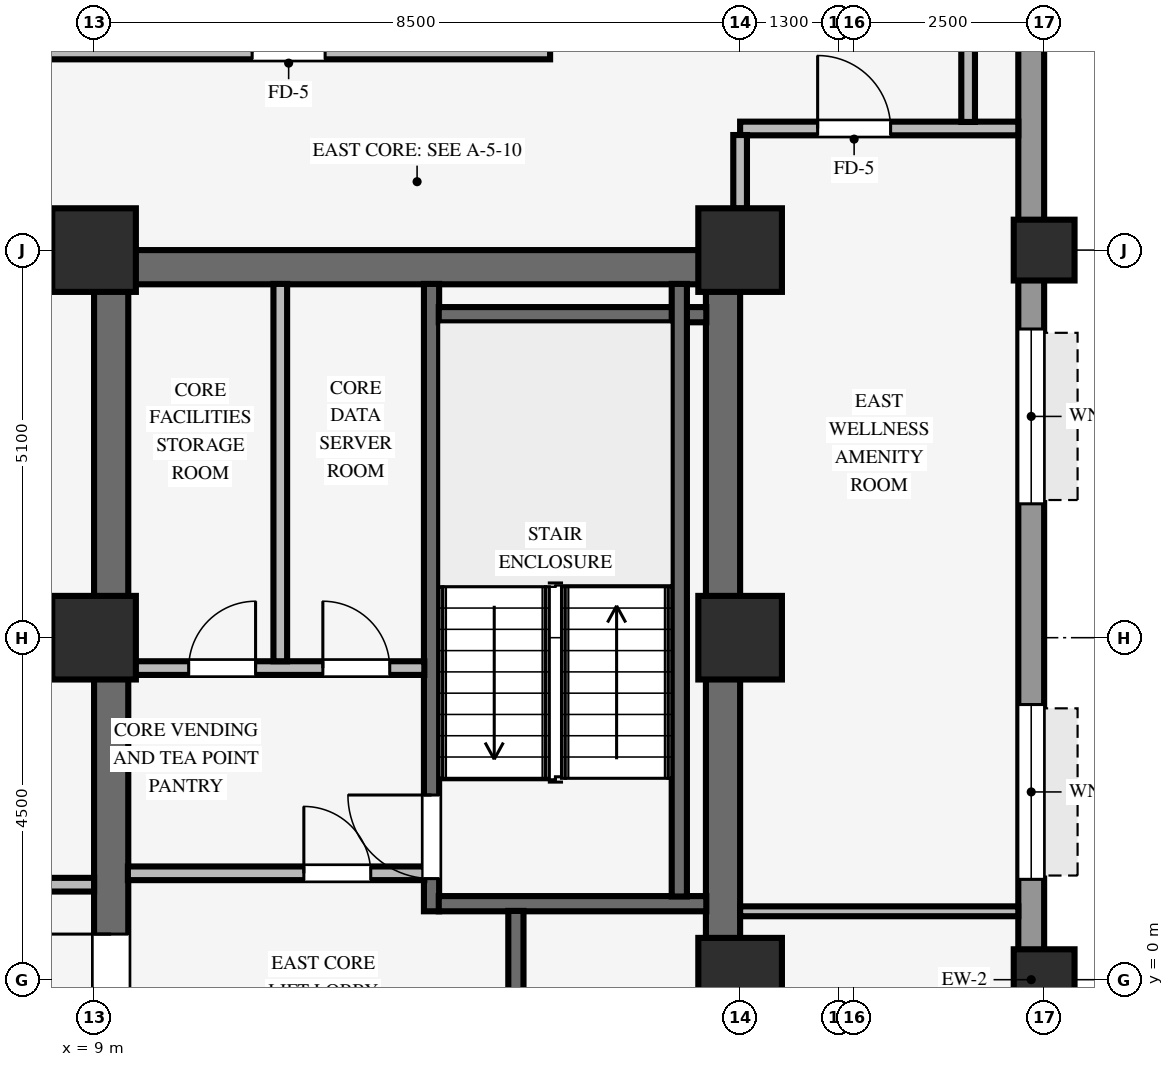
"""IFC4 building model, lengths in metres.
Left out: names, types, materials, properties, quantities, classifications, styles, units other than length and angle.
Written with IfcOpenShell. Run it as: python <this file> out.ifc"""

import sys

from ifc_helpers import new_model, si_unit, direction, frame, frame_2d, origin, origin_2d, place, context, subcontext, project, spatial, rectangle, hollow_rectangle, extrude, source, transform, mapped, element, fill, save


model = new_model("IFC4")
c1 = context("Model", 3, precision=1e-05, world=origin(), true_north=direction((0.0, 1.0)))
c2 = subcontext(c1, "Body", "Model", "MODEL_VIEW")
j1 = project(units=[si_unit("LENGTHUNIT", "METRE"), si_unit("PLANEANGLEUNIT", "RADIAN")], contexts=[c1])
p1 = place(None, origin())
s1 = spatial("IfcSite", under=j1, at=p1, CompositionType="ELEMENT")
p2 = place(p1, origin())
s2 = spatial("IfcBuilding", under=s1, at=p2, CompositionType="ELEMENT")
p3 = place(p2, frame((0.0, 0.0, 64.1)))
s3 = spatial("IfcBuildingStorey", under=s2, at=p3, CompositionType="ELEMENT", Elevation=64.1)
p4 = place(p3, frame((9.0, 9.375, 0.0), z_axis=(0.0, 0.0, 1.0), x_axis=(1.0, 0.0, 0.0)))
e1 = element("IfcWall", 1, at=p4, inside=s3, PredefinedType="SHEAR", context=c2, shape_type="SweptSolid", body=[
    extrude(rectangle(XDim=8.5, YDim=0.45, at=frame_2d((4.25, 0.0))), origin(), (0.0, 0.0, 1.0), 3.37),
])
p5 = place(p3, frame((9.225, -9.155, 0.0), z_axis=(0.0, 0.0, 1.0), x_axis=(0.0, 1.0, 0.0)))
e2 = element("IfcWall", 2, at=p5, inside=s3, PredefinedType="SHEAR", context=c2, shape_type="SweptSolid", body=[
    extrude(rectangle(XDim=18.31, YDim=0.45, at=frame_2d((9.155, 0.0))), origin(), (0.0, 0.0, 1.0), 3.37),
])
p6 = place(p5, frame((8.555, 0.0, 0.0)))
e3 = element("IfcOpeningElement", 3, at=p6, cuts=e2, PredefinedType="OPENING", context=c2, shape_type="SweptSolid", body=[
    extrude(rectangle(XDim=1.2, YDim=2.15, at=frame_2d((0.6, 1.075))), frame((0.0, 0.235, 0.0), z_axis=(0.0, -1.0, 0.0), x_axis=(1.0, 0.0, 0.0)), (0.0, 0.0, 1.0), 0.47),
])
p7 = place(p3, frame((17.275, -9.155, 0.0), z_axis=(0.0, 0.0, 1.0), x_axis=(0.0, 1.0, 0.0)))
e4 = element("IfcWall", 4, at=p7, inside=s3, PredefinedType="SHEAR", context=c2, shape_type="SweptSolid", body=[
    extrude(rectangle(XDim=18.31, YDim=0.45, at=frame_2d((9.155, 0.0))), origin(), (0.0, 0.0, 1.0), 3.37),
])
for number, where, z_axis, x_axis in (
    (5, (9.0, 4.5, 0.0), (0.0, 0.0, 1.0), (1.0, 0.0, 0.0)),
    (6, (9.0, 9.6, 0.0), (0.0, 0.0, 1.0), (1.0, 0.0, 0.0)),
    (7, (17.5, 4.5, 0.0), (0.0, 0.0, 1.0), (1.0, 0.0, 0.0)),
    (8, (17.5, 9.6, 0.0), (0.0, 0.0, 1.0), (1.0, 0.0, 0.0)),
    (9, (17.5, 0.0, 0.0), (0.0, 0.0, 1.0), (1.0, 0.0, 0.0)),
):
    element("IfcColumn", number, at=place(p3, frame(where, z_axis=z_axis, x_axis=x_axis)), inside=s3, PredefinedType="COLUMN", context=c2, shape_type="SweptSolid", body=[
        extrude(rectangle(XDim=1.1, YDim=1.1, at=origin_2d()), origin(), (0.0, 0.0, 1.0), 3.37),
    ])
for number, where, z_axis, x_axis in (
    (10, (21.5, 0.0, 0.0), (0.0, 0.0, 1.0), (1.0, 0.0, 0.0)),
    (11, (21.5, 9.6, 0.0), (0.0, 0.0, 1.0), (1.0, 0.0, 0.0)),
):
    element("IfcColumn", number, at=place(p3, frame(where, z_axis=z_axis, x_axis=x_axis)), inside=s3, PredefinedType="COLUMN", context=c2, shape_type="SweptSolid", body=[
        extrude(hollow_rectangle(XDim=0.8, YDim=0.8, WallThickness=0.055, InnerFilletRadius=0.055, OuterFilletRadius=0.11, at=origin_2d()), origin(), (0.0, 0.0, 1.0), 3.37),
    ])
p8 = place(p3, frame((21.33, -20.764, 0.0), z_axis=(0.0, 0.0, 1.0), x_axis=(0.0, 1.0, 0.0)))
e12 = element("IfcWall", 12, at=p8, inside=s3, PredefinedType="STANDARD", context=c2, shape_type="SweptSolid", body=[
    extrude(rectangle(XDim=41.528, YDim=0.34, at=frame_2d((20.764, 0.0))), origin(), (0.0, 0.0, 1.0), 2.705),
])
p9 = place(p8, frame((12.202, 0.0, 0.8)))
e13 = element("IfcOpeningElement", 13, at=p9, cuts=e12, PredefinedType="OPENING", context=c2, shape_type="SweptSolid", body=[
    extrude(rectangle(XDim=2.3, YDim=1.62, at=frame_2d((1.15, 0.81))), frame((0.0, 0.18, 0.0), z_axis=(0.0, -1.0, 0.0), x_axis=(1.0, 0.0, 0.0)), (0.0, 0.0, 1.0), 0.36),
])
p10 = place(p8, frame((17.144, 0.0, 0.8)))
e14 = element("IfcOpeningElement", 14, at=p10, cuts=e12, PredefinedType="OPENING", context=c2, shape_type="SweptSolid", body=[
    extrude(rectangle(XDim=2.3, YDim=1.62, at=frame_2d((1.15, 0.81))), frame((0.0, 0.18, 0.0), z_axis=(0.0, -1.0, 0.0), x_axis=(1.0, 0.0, 0.0)), (0.0, 0.0, 1.0), 0.36),
])
p11 = place(p8, frame((22.084, 0.0, 0.8)))
e15 = element("IfcOpeningElement", 15, at=p11, cuts=e12, PredefinedType="OPENING", context=c2, shape_type="SweptSolid", body=[
    extrude(rectangle(XDim=2.3, YDim=1.62, at=frame_2d((1.15, 0.81))), frame((0.0, 0.18, 0.0), z_axis=(0.0, -1.0, 0.0), x_axis=(1.0, 0.0, 0.0)), (0.0, 0.0, 1.0), 0.36),
])
p12 = place(p8, frame((27.025, 0.0, 0.8)))
e16 = element("IfcOpeningElement", 16, at=p12, cuts=e12, PredefinedType="OPENING", context=c2, shape_type="SweptSolid", body=[
    extrude(rectangle(XDim=2.3, YDim=1.62, at=frame_2d((1.15, 0.81))), frame((0.0, 0.18, 0.0), z_axis=(0.0, -1.0, 0.0), x_axis=(1.0, 0.0, 0.0)), (0.0, 0.0, 1.0), 0.36),
])
p13 = place(p3, frame((13.44, 0.9, 0.0), z_axis=(0.0, 0.0, 1.0), x_axis=(0.0, 1.0, 0.0)))
e17 = element("IfcWall", 17, at=p13, inside=s3, PredefinedType="SHEAR", context=c2, shape_type="SweptSolid", body=[
    extrude(rectangle(XDim=8.255, YDim=0.2, at=frame_2d((4.127, 0.0))), origin(), (0.0, 0.0, 1.0), 3.37),
])
p14 = place(p13, frame((0.43, 0.0, 0.0)))
e18 = element("IfcOpeningElement", 18, at=p14, cuts=e17, PredefinedType="OPENING", context=c2, shape_type="SweptSolid", body=[
    extrude(rectangle(XDim=1.1, YDim=2.15, at=frame_2d((0.55, 1.075))), frame((0.0, 0.11, 0.0), z_axis=(0.0, -1.0, 0.0), x_axis=(1.0, 0.0, 0.0)), (0.0, 0.0, 1.0), 0.22),
])
for number, where, z_axis, x_axis in (
    (19, (13.535, 1.0, 0.0), (0.0, 0.0, 1.0), (1.0, 0.0, 0.0)),
    (20, (13.535, 8.75, 0.0), (0.0, 0.0, 1.0), (1.0, 0.0, 0.0)),
):
    element("IfcWall", number, at=place(p3, frame(where, z_axis=z_axis, x_axis=x_axis)), inside=s3, PredefinedType="SHEAR", context=c2, shape_type="SweptSolid", body=[
        extrude(rectangle(XDim=3.52, YDim=0.2, at=frame_2d((1.76, 0.0))), origin(), (0.0, 0.0, 1.0), 3.37),
    ])
p15 = place(p3, frame((16.7, 1.095, 0.0), z_axis=(0.0, 0.0, 1.0), x_axis=(0.0, 1.0, 0.0)))
e21 = element("IfcWall", 21, at=p15, inside=s3, PredefinedType="SHEAR", context=c2, shape_type="SweptSolid", body=[
    extrude(rectangle(XDim=8.06, YDim=0.2, at=frame_2d((4.03, 0.0))), origin(), (0.0, 0.0, 1.0), 3.37),
])
p16 = place(p3, frame((14.55, -9.155, 0.0), z_axis=(0.0, 0.0, 1.0), x_axis=(0.0, 1.0, 0.0)))
e22 = element("IfcWall", 22, at=p16, inside=s3, PredefinedType="SHEAR", context=c2, shape_type="SweptSolid", body=[
    extrude(rectangle(XDim=10.06, YDim=0.2, at=frame_2d((5.03, 0.0))), origin(), (0.0, 0.0, 1.0), 3.37),
])
p17 = place(p16, frame((6.515, 0.0, 0.0)))
e23 = element("IfcOpeningElement", 23, at=p17, cuts=e22, PredefinedType="OPENING", context=c2, shape_type="SweptSolid", body=[
    extrude(rectangle(XDim=0.88, YDim=2.1, at=frame_2d((0.44, 1.05))), frame((0.0, 0.11, 0.0), z_axis=(0.0, -1.0, 0.0), x_axis=(1.0, 0.0, 0.0)), (0.0, 0.0, 1.0), 0.22),
])
p18 = place(p16, frame((0.88, 0.0, 0.0)))
e24 = element("IfcOpeningElement", 24, at=p18, cuts=e22, PredefinedType="OPENING", context=c2, shape_type="SweptSolid", body=[
    extrude(rectangle(XDim=1.15, YDim=2.15, at=frame_2d((0.575, 1.075))), frame((0.0, 0.11, 0.0), z_axis=(0.0, -1.0, 0.0), x_axis=(1.0, 0.0, 0.0)), (0.0, 0.0, 1.0), 0.22),
])
p19 = place(p3, frame((9.445, 1.4, 0.0), z_axis=(0.0, 0.0, 1.0), x_axis=(1.0, 0.0, 0.0)))
e25 = element("IfcWall", 25, at=p19, inside=s3, PredefinedType="PARTITIONING", context=c2, shape_type="SweptSolid", body=[
    extrude(rectangle(XDim=3.9, YDim=0.18, at=frame_2d((1.95, 0.0))), origin(), (0.0, 0.0, 1.0), 3.36),
])
p20 = place(p19, frame((2.315, 0.0, 0.0)))
e26 = element("IfcOpeningElement", 26, at=p20, cuts=e25, PredefinedType="OPENING", context=c2, shape_type="SweptSolid", body=[
    extrude(rectangle(XDim=0.88, YDim=2.1, at=frame_2d((0.44, 1.05))), frame((0.0, 0.1, 0.0), z_axis=(0.0, -1.0, 0.0), x_axis=(1.0, 0.0, 0.0)), (0.0, 0.0, 1.0), 0.2),
])
p21 = place(p3, frame((9.445, 4.1, 0.0), z_axis=(0.0, 0.0, 1.0), x_axis=(1.0, 0.0, 0.0)))
e27 = element("IfcWall", 27, at=p21, inside=s3, PredefinedType="PARTITIONING", context=c2, shape_type="SweptSolid", body=[
    extrude(rectangle(XDim=3.9, YDim=0.18, at=frame_2d((1.95, 0.0))), origin(), (0.0, 0.0, 1.0), 3.36),
])
p22 = place(p21, frame((0.8, 0.0, 0.0)))
e28 = element("IfcOpeningElement", 28, at=p22, cuts=e27, PredefinedType="OPENING", context=c2, shape_type="SweptSolid", body=[
    extrude(rectangle(XDim=0.88, YDim=2.1, at=frame_2d((0.44, 1.05))), frame((0.0, 0.1, 0.0), z_axis=(0.0, -1.0, 0.0), x_axis=(1.0, 0.0, 0.0)), (0.0, 0.0, 1.0), 0.2),
])
p23 = place(p21, frame((2.565, 0.0, 0.0)))
e29 = element("IfcOpeningElement", 29, at=p23, cuts=e27, PredefinedType="OPENING", context=c2, shape_type="SweptSolid", body=[
    extrude(rectangle(XDim=0.88, YDim=2.1, at=frame_2d((0.44, 1.05))), frame((0.0, 0.1, 0.0), z_axis=(0.0, -1.0, 0.0), x_axis=(1.0, 0.0, 0.0)), (0.0, 0.0, 1.0), 0.2),
])
p24 = place(p3, frame((11.45, 4.19, 0.0), z_axis=(0.0, 0.0, 1.0), x_axis=(0.0, 1.0, 0.0)))
e30 = element("IfcWall", 30, at=p24, inside=s3, PredefinedType="PARTITIONING", context=c2, shape_type="SweptSolid", body=[
    extrude(rectangle(XDim=4.965, YDim=0.18, at=frame_2d((2.482, 0.0))), origin(), (0.0, 0.0, 1.0), 3.36),
])
p25 = place(p3, frame((17.5, 0.9, 0.0), z_axis=(0.0, 0.0, 1.0), x_axis=(1.0, 0.0, 0.0)))
e31 = element("IfcWall", 31, at=p25, inside=s3, PredefinedType="PARTITIONING", context=c2, shape_type="SweptSolid", body=[
    extrude(rectangle(XDim=3.66, YDim=0.13, at=frame_2d((1.83, 0.0))), origin(), (0.0, 0.0, 1.0), 3.36),
])
p26 = place(p3, frame((-0.8, 1.25, 0.0), z_axis=(0.0, 0.0, 1.0), x_axis=(1.0, 0.0, 0.0)))
e32 = element("IfcWall", 32, at=p26, inside=s3, PredefinedType="PARTITIONING", context=c2, shape_type="SweptSolid", body=[
    extrude(rectangle(XDim=9.8, YDim=0.18, at=frame_2d((4.9, 0.0))), origin(), (0.0, 0.0, 1.0), 3.36),
])
p27 = place(p26, frame((4.42, 0.0, 0.0)))
e33 = element("IfcOpeningElement", 33, at=p27, cuts=e32, PredefinedType="OPENING", context=c2, shape_type="SweptSolid", body=[
    extrude(rectangle(XDim=0.96, YDim=2.1, at=frame_2d((0.48, 1.05))), frame((0.0, 0.1, 0.0), z_axis=(0.0, -1.0, 0.0), x_axis=(1.0, 0.0, 0.0)), (0.0, 0.0, 1.0), 0.2),
])
p28 = place(p3, frame((0.176, 9.6, 0.0), z_axis=(0.0, 0.0, 1.0), x_axis=(1.0, 0.0, 0.0)))
e34 = element("IfcWall", 34, at=p28, inside=s3, PredefinedType="PARTITIONING", context=c2, shape_type="SweptSolid", body=[
    extrude(rectangle(XDim=8.278, YDim=0.18, at=frame_2d((4.139, 0.0))), origin(), (0.0, 0.0, 1.0), 2.405),
])
p29 = place(p3, frame((17.5, 11.2, 0.0), z_axis=(0.0, 0.0, 1.0), x_axis=(1.0, 0.0, 0.0)))
e35 = element("IfcWall", 35, at=p29, inside=s3, PredefinedType="PARTITIONING", context=c2, shape_type="SweptSolid", body=[
    extrude(rectangle(XDim=3.66, YDim=0.18, at=frame_2d((1.83, 0.0))), origin(), (0.0, 0.0, 1.0), 3.36),
])
p30 = place(p29, frame((1.02, 0.0, 0.0)))
e36 = element("IfcOpeningElement", 36, at=p30, cuts=e35, PredefinedType="OPENING", context=c2, shape_type="SweptSolid", body=[
    extrude(rectangle(XDim=0.96, YDim=2.1, at=frame_2d((0.48, 1.05))), frame((0.0, 0.1, 0.0), z_axis=(0.0, -1.0, 0.0), x_axis=(1.0, 0.0, 0.0)), (0.0, 0.0, 1.0), 0.2),
])
p31 = place(p3, frame((-15.0, 12.2, 0.0), z_axis=(0.0, 0.0, 1.0), x_axis=(1.0, 0.0, 0.0)))
e37 = element("IfcWall", 37, at=p31, inside=s3, PredefinedType="PARTITIONING", context=c2, shape_type="SweptSolid", body=[
    extrude(rectangle(XDim=30.0, YDim=0.18, at=frame_2d((15.0, 0.0))), origin(), (0.0, 0.0, 1.0), 3.36),
])
p32 = place(p31, frame((2.195, 0.0, 0.0)))
e38 = element("IfcOpeningElement", 38, at=p32, cuts=e37, PredefinedType="OPENING", context=c2, shape_type="SweptSolid", body=[
    extrude(rectangle(XDim=0.96, YDim=2.1, at=frame_2d((0.48, 1.05))), frame((0.0, 0.1, 0.0), z_axis=(0.0, -1.0, 0.0), x_axis=(1.0, 0.0, 0.0)), (0.0, 0.0, 1.0), 0.2),
])
p33 = place(p31, frame((16.395, 0.0, 0.0)))
e39 = element("IfcOpeningElement", 39, at=p33, cuts=e37, PredefinedType="OPENING", context=c2, shape_type="SweptSolid", body=[
    extrude(rectangle(XDim=0.96, YDim=2.1, at=frame_2d((0.48, 1.05))), frame((0.0, 0.1, 0.0), z_axis=(0.0, -1.0, 0.0), x_axis=(1.0, 0.0, 0.0)), (0.0, 0.0, 1.0), 0.2),
])
p34 = place(p31, frame((21.62, 0.0, 0.0)))
e40 = element("IfcOpeningElement", 40, at=p34, cuts=e37, PredefinedType="OPENING", context=c2, shape_type="SweptSolid", body=[
    extrude(rectangle(XDim=0.96, YDim=2.1, at=frame_2d((0.48, 1.05))), frame((0.0, 0.1, 0.0), z_axis=(0.0, -1.0, 0.0), x_axis=(1.0, 0.0, 0.0)), (0.0, 0.0, 1.0), 0.2),
])
p35 = place(p31, frame((7.33, 0.0, 0.0)))
e41 = element("IfcOpeningElement", 41, at=p35, cuts=e37, PredefinedType="OPENING", context=c2, shape_type="SweptSolid", body=[
    extrude(rectangle(XDim=0.96, YDim=2.1, at=frame_2d((0.48, 1.05))), frame((0.0, 0.1, 0.0), z_axis=(0.0, -1.0, 0.0), x_axis=(1.0, 0.0, 0.0)), (0.0, 0.0, 1.0), 0.2),
])
p36 = place(p31, frame((26.08, 0.0, 0.0)))
e42 = element("IfcOpeningElement", 42, at=p36, cuts=e37, PredefinedType="OPENING", context=c2, shape_type="SweptSolid", body=[
    extrude(rectangle(XDim=0.96, YDim=2.1, at=frame_2d((0.48, 1.05))), frame((0.0, 0.1, 0.0), z_axis=(0.0, -1.0, 0.0), x_axis=(1.0, 0.0, 0.0)), (0.0, 0.0, 1.0), 0.2),
])
p37 = place(p31, frame((12.52, 0.0, 0.0)))
e43 = element("IfcOpeningElement", 43, at=p37, cuts=e37, PredefinedType="OPENING", context=c2, shape_type="SweptSolid", body=[
    extrude(rectangle(XDim=0.96, YDim=2.1, at=frame_2d((0.48, 1.05))), frame((0.0, 0.1, 0.0), z_axis=(0.0, -1.0, 0.0), x_axis=(1.0, 0.0, 0.0)), (0.0, 0.0, 1.0), 0.2),
])
p38 = place(p3, frame((17.5, 10.146, 0.0), z_axis=(0.0, 0.0, 1.0), x_axis=(0.0, 1.0, 0.0)))
e44 = element("IfcWall", 44, at=p38, inside=s3, PredefinedType="PARTITIONING", context=c2, shape_type="SweptSolid", body=[
    extrude(rectangle(XDim=0.968, YDim=0.18, at=frame_2d((0.484, 0.0))), origin(), (0.0, 0.0, 1.0), 2.738),
])
p39 = place(p3, frame((20.5, 11.286, 0.0), z_axis=(0.0, 0.0, 1.0), x_axis=(0.0, 1.0, 0.0)))
e45 = element("IfcWall", 45, at=p39, inside=s3, PredefinedType="PARTITIONING", context=c2, shape_type="SweptSolid", body=[
    extrude(rectangle(XDim=2.228, YDim=0.18, at=frame_2d((1.114, 0.0))), origin(), (0.0, 0.0, 1.0), 3.36),
])
m1 = source(origin(), c2, "Body", "SweptSolid", [
    extrude(rectangle(XDim=2.3, YDim=1.62, at=frame_2d((1.15, 0.81))), frame((0.0, 0.03, 0.0), z_axis=(0.0, -1.0, 0.0), x_axis=(1.0, 0.0, 0.0)), (0.0, 0.0, 1.0), 0.06),
])
p40 = place(p11, origin())
e46 = element("IfcWindow", 46, at=p40, inside=s3, PartitioningType="SINGLE_PANEL", PredefinedType="WINDOW", context=c2, shape_type="MappedRepresentation", body=[
    mapped(m1, transform((0.0, 0.0, 0.0), scale=1.0)),
])
fill(e15, e46)
p41 = place(p12, origin())
e47 = element("IfcWindow", 47, at=p41, inside=s3, PartitioningType="SINGLE_PANEL", PredefinedType="WINDOW", context=c2, shape_type="MappedRepresentation", body=[
    mapped(m1, transform((0.0, 0.0, 0.0), scale=1.0)),
])
fill(e16, e47)
m2 = source(origin(), c2, "Body", "SweptSolid", [
    extrude(rectangle(XDim=1.1, YDim=2.15, at=frame_2d((0.55, 1.075))), frame((0.0, 0.025, 0.0), z_axis=(0.0, -1.0, 0.0), x_axis=(1.0, 0.0, 0.0)), (0.0, 0.0, 1.0), 0.05),
])
p42 = place(p14, origin())
e48 = element("IfcDoor", 48, at=p42, inside=s3, OperationType="SINGLE_SWING_RIGHT", PredefinedType="DOOR", context=c2, shape_type="MappedRepresentation", body=[
    mapped(m2, transform((0.0, 0.0, 0.0), scale=1.0)),
])
fill(e18, e48)
m3 = source(origin(), c2, "Body", "SweptSolid", [
    extrude(rectangle(XDim=1.2, YDim=2.15, at=frame_2d((0.6, 1.075))), frame((0.0, 0.025, 0.0), z_axis=(0.0, -1.0, 0.0), x_axis=(1.0, 0.0, 0.0)), (0.0, 0.0, 1.0), 0.05),
])
p43 = place(p6, origin())
e49 = element("IfcDoor", 49, at=p43, inside=s3, OperationType="SINGLE_SWING_RIGHT", PredefinedType="DOOR", context=c2, shape_type="MappedRepresentation", body=[
    mapped(m3, transform((0.0, 0.0, 0.0), scale=1.0)),
])
fill(e3, e49)
m4 = source(origin(), c2, "Body", "SweptSolid", [
    extrude(rectangle(XDim=0.88, YDim=2.1, at=frame_2d((0.44, 1.05))), frame((0.0, 0.025, 0.0), z_axis=(0.0, -1.0, 0.0), x_axis=(1.0, 0.0, 0.0)), (0.0, 0.0, 1.0), 0.05),
])
p44 = place(p20, origin())
e50 = element("IfcDoor", 50, at=p44, inside=s3, OperationType="SINGLE_SWING_LEFT", PredefinedType="DOOR", context=c2, shape_type="MappedRepresentation", body=[
    mapped(m4, transform((0.0, 0.0, 0.0), scale=1.0)),
])
fill(e26, e50)
p45 = place(p22, origin())
e51 = element("IfcDoor", 51, at=p45, inside=s3, OperationType="SINGLE_SWING_RIGHT", PredefinedType="DOOR", context=c2, shape_type="MappedRepresentation", body=[
    mapped(m4, transform((0.0, 0.0, 0.0), scale=1.0)),
])
fill(e28, e51)
p46 = place(p23, origin())
e52 = element("IfcDoor", 52, at=p46, inside=s3, OperationType="SINGLE_SWING_LEFT", PredefinedType="DOOR", context=c2, shape_type="MappedRepresentation", body=[
    mapped(m4, transform((0.0, 0.0, 0.0), scale=1.0)),
])
fill(e29, e52)
m5 = source(origin(), c2, "Body", "SweptSolid", [
    extrude(rectangle(XDim=0.96, YDim=2.1, at=frame_2d((0.48, 1.05))), frame((0.0, 0.025, 0.0), z_axis=(0.0, -1.0, 0.0), x_axis=(1.0, 0.0, 0.0)), (0.0, 0.0, 1.0), 0.05),
])
p47 = place(p36, origin())
e53 = element("IfcDoor", 53, at=p47, inside=s3, OperationType="SINGLE_SWING_LEFT", PredefinedType="DOOR", context=c2, shape_type="MappedRepresentation", body=[
    mapped(m5, transform((0.0, 0.0, 0.0), scale=1.0)),
])
fill(e42, e53)
p48 = place(p30, origin())
e54 = element("IfcDoor", 54, at=p48, inside=s3, OperationType="SINGLE_SWING_LEFT", PredefinedType="DOOR", context=c2, shape_type="MappedRepresentation", body=[
    mapped(m5, transform((0.0, 0.0, 0.0), scale=1.0)),
])
fill(e36, e54)
save(model, sys.argv[1])
